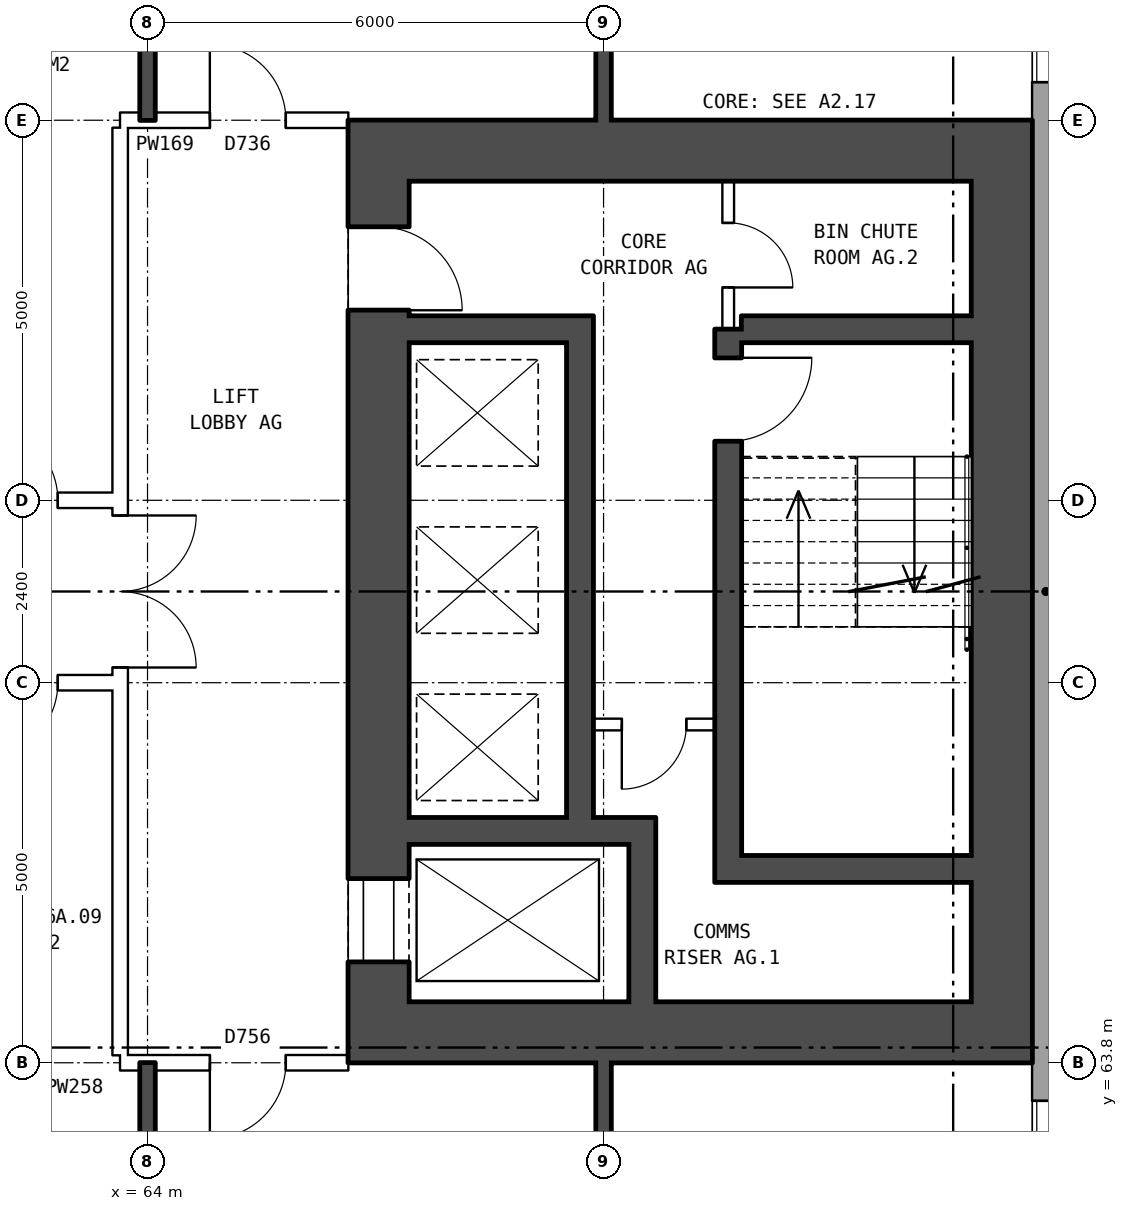
"""IFC4 building model, lengths in metres.
Left out: names, types, materials, properties, quantities, classifications, styles, units other than length and angle.
Written with IfcOpenShell. Run it as: python <this file> out.ifc"""

import sys

from ifc_helpers import new_model, si_unit, direction, frame, frame_2d, origin, place, context, subcontext, project, spatial, rectangle, extrude, element, fill, save


model = new_model("IFC4")
c1 = context("Model", 3, precision=1e-05, world=origin(), true_north=direction((0.0, 1.0)))
c2 = subcontext(c1, "Body", "Model", "MODEL_VIEW")
j1 = project(units=[si_unit("LENGTHUNIT", "METRE"), si_unit("PLANEANGLEUNIT", "RADIAN")], contexts=[c1])
p1 = place(None, origin())
s1 = spatial("IfcSite", under=j1, at=p1, CompositionType="ELEMENT")
p2 = place(p1, origin())
s2 = spatial("IfcBuilding", under=s1, at=p2, CompositionType="ELEMENT")
p3 = place(p2, frame((0.0, 0.0, 59.8)))
s3 = spatial("IfcBuildingStorey", under=s2, at=p3, CompositionType="ELEMENT", Elevation=59.8)
p4 = place(p3, frame((75.82, 57.075, 0.0), z_axis=(0.0, 0.0, 1.0), x_axis=(0.0, 1.0, 0.0)))
e1 = element("IfcWall", 1, at=p4, inside=s3, PredefinedType="STANDARD", context=c2, shape_type="SweptSolid", body=[
    extrude(rectangle(XDim=25.851, YDim=0.36, at=frame_2d((12.925, 0.0))), origin(), (0.0, 0.0, 1.0), 2.85),
])
p5 = place(p4, frame((1.625, 0.0, 0.8)))
e2 = element("IfcOpeningElement", 2, at=p5, cuts=e1, PredefinedType="OPENING", context=c2, shape_type="SweptSolid", body=[
    extrude(rectangle(XDim=1.6, YDim=1.8, at=frame_2d((0.8, 0.9))), frame((0.0, 0.19, 0.0), z_axis=(0.0, -1.0, 0.0), x_axis=(1.0, 0.0, 0.0)), (0.0, 0.0, 1.0), 0.38),
])
p6 = place(p4, frame((4.625, 0.0, 0.8)))
e3 = element("IfcOpeningElement", 3, at=p6, cuts=e1, PredefinedType="OPENING", context=c2, shape_type="SweptSolid", body=[
    extrude(rectangle(XDim=1.6, YDim=1.8, at=frame_2d((0.8, 0.9))), frame((0.0, 0.19, 0.0), z_axis=(0.0, -1.0, 0.0), x_axis=(1.0, 0.0, 0.0)), (0.0, 0.0, 1.0), 0.38),
])
p7 = place(p4, frame((19.625, 0.0, 0.8)))
e4 = element("IfcOpeningElement", 4, at=p7, cuts=e1, PredefinedType="OPENING", context=c2, shape_type="SweptSolid", body=[
    extrude(rectangle(XDim=1.6, YDim=1.8, at=frame_2d((0.8, 0.9))), frame((0.0, 0.19, 0.0), z_axis=(0.0, -1.0, 0.0), x_axis=(1.0, 0.0, 0.0)), (0.0, 0.0, 1.0), 0.38),
])
p8 = place(p4, frame((22.625, 0.0, 0.8)))
e5 = element("IfcOpeningElement", 5, at=p8, cuts=e1, PredefinedType="OPENING", context=c2, shape_type="SweptSolid", body=[
    extrude(rectangle(XDim=1.6, YDim=1.8, at=frame_2d((0.8, 0.9))), frame((0.0, 0.19, 0.0), z_axis=(0.0, -1.0, 0.0), x_axis=(1.0, 0.0, 0.0)), (0.0, 0.0, 1.0), 0.38),
])
p9 = place(p3, frame((67.04, 64.6, 0.0), z_axis=(0.0, 0.0, 1.0), x_axis=(0.0, 1.0, 0.0)))
e6 = element("IfcWall", 6, at=p9, inside=s3, PredefinedType="SHEAR", context=c2, shape_type="SweptSolid", body=[
    extrude(rectangle(XDim=10.8, YDim=0.8, at=frame_2d((5.4, 0.0))), origin(), (0.0, 0.0, 1.0), 2.85),
])
p10 = place(p9, frame((0.525, 0.0, 0.0)))
e7 = element("IfcOpeningElement", 7, at=p10, cuts=e6, PredefinedType="OPENING", context=c2, shape_type="SweptSolid", body=[
    extrude(rectangle(XDim=1.1, YDim=2.1, at=frame_2d((0.55, 1.05))), frame((0.0, 0.41, 0.0), z_axis=(0.0, -1.0, 0.0), x_axis=(1.0, 0.0, 0.0)), (0.0, 0.0, 1.0), 0.82),
])
p11 = place(p9, frame((9.1, 0.0, 0.0)))
e8 = element("IfcOpeningElement", 8, at=p11, cuts=e6, PredefinedType="OPENING", context=c2, shape_type="SweptSolid", body=[
    extrude(rectangle(XDim=1.1, YDim=2.1, at=frame_2d((0.55, 1.05))), frame((0.0, 0.41, 0.0), z_axis=(0.0, -1.0, 0.0), x_axis=(1.0, 0.0, 0.0)), (0.0, 0.0, 1.0), 0.82),
])
p12 = place(p3, frame((75.24, 64.6, 0.0), z_axis=(0.0, 0.0, 1.0), x_axis=(0.0, 1.0, 0.0)))
e9 = element("IfcWall", 9, at=p12, inside=s3, PredefinedType="SHEAR", context=c2, shape_type="SweptSolid", body=[
    extrude(rectangle(XDim=10.8, YDim=0.8, at=frame_2d((5.4, 0.0))), origin(), (0.0, 0.0, 1.0), 2.85),
])
for number, where, z_axis, x_axis in (
    (10, (66.64, 64.2, 0.0), (0.0, 0.0, 1.0), (1.0, 0.0, 0.0)),
    (11, (66.64, 75.8, 0.0), (0.0, 0.0, 1.0), (1.0, 0.0, 0.0)),
):
    element("IfcWall", number, at=place(p3, frame(where, z_axis=z_axis, x_axis=x_axis)), inside=s3, PredefinedType="SHEAR", context=c2, shape_type="SweptSolid", body=[
        extrude(rectangle(XDim=9.0, YDim=0.8, at=frame_2d((4.5, 0.0))), origin(), (0.0, 0.0, 1.0), 2.85),
    ])
p13 = place(p3, frame((71.815, 66.35, 0.0), z_axis=(0.0, 0.0, 1.0), x_axis=(1.0, 0.0, 0.0)))
e12 = element("IfcWall", 12, at=p13, inside=s3, PredefinedType="SHEAR", context=c2, shape_type="SweptSolid", body=[
    extrude(rectangle(XDim=3.025, YDim=0.35, at=frame_2d((1.513, 0.0))), origin(), (0.0, 0.0, 1.0), 2.85),
])
p14 = place(p3, frame((67.44, 66.85, 0.0), z_axis=(0.0, 0.0, 1.0), x_axis=(1.0, 0.0, 0.0)))
e13 = element("IfcWall", 13, at=p14, inside=s3, PredefinedType="SHEAR", context=c2, shape_type="SweptSolid", body=[
    extrude(rectangle(XDim=3.245, YDim=0.35, at=frame_2d((1.623, 0.0))), origin(), (0.0, 0.0, 1.0), 2.85),
])
p15 = place(p3, frame((69.865, 68.25, 0.0), z_axis=(0.0, 0.0, 1.0), x_axis=(1.0, 0.0, 0.0)))
e14 = element("IfcWall", 14, at=p15, inside=s3, PredefinedType="PARTITIONING", context=c2, shape_type="SweptSolid", body=[
    extrude(rectangle(XDim=1.6, YDim=0.15, at=frame_2d((0.8, 0.0))), origin(), (0.0, 0.0, 1.0), 2.85),
])
p16 = place(p15, frame((0.375, 0.0, 0.0)))
e15 = element("IfcOpeningElement", 15, at=p16, cuts=e14, PredefinedType="OPENING", context=c2, shape_type="SweptSolid", body=[
    extrude(rectangle(XDim=0.85, YDim=2.1, at=frame_2d((0.425, 1.05))), frame((0.0, 0.085, 0.0), z_axis=(0.0, -1.0, 0.0), x_axis=(1.0, 0.0, 0.0)), (0.0, 0.0, 1.0), 0.17),
])
p17 = place(p3, frame((67.44, 73.45, 0.0), z_axis=(0.0, 0.0, 1.0), x_axis=(1.0, 0.0, 0.0)))
e16 = element("IfcWall", 16, at=p17, inside=s3, PredefinedType="SHEAR", context=c2, shape_type="SweptSolid", body=[
    extrude(rectangle(XDim=2.075, YDim=0.35, at=frame_2d((1.038, 0.0))), origin(), (0.0, 0.0, 1.0), 2.85),
])
p18 = place(p3, frame((71.815, 73.45, 0.0), z_axis=(0.0, 0.0, 1.0), x_axis=(1.0, 0.0, 0.0)))
e17 = element("IfcWall", 17, at=p18, inside=s3, PredefinedType="SHEAR", context=c2, shape_type="SweptSolid", body=[
    extrude(rectangle(XDim=3.025, YDim=0.35, at=frame_2d((1.513, 0.0))), origin(), (0.0, 0.0, 1.0), 2.85),
])
p19 = place(p3, frame((69.69, 67.025, 0.0), z_axis=(0.0, 0.0, 1.0), x_axis=(0.0, 1.0, 0.0)))
e18 = element("IfcWall", 18, at=p19, inside=s3, PredefinedType="SHEAR", context=c2, shape_type="SweptSolid", body=[
    extrude(rectangle(XDim=6.6, YDim=0.35, at=frame_2d((3.3, 0.0))), origin(), (0.0, 0.0, 1.0), 2.85),
])
p20 = place(p3, frame((70.51, 64.6, 0.0), z_axis=(0.0, 0.0, 1.0), x_axis=(0.0, 1.0, 0.0)))
e19 = element("IfcWall", 19, at=p20, inside=s3, PredefinedType="SHEAR", context=c2, shape_type="SweptSolid", body=[
    extrude(rectangle(XDim=2.075, YDim=0.35, at=frame_2d((1.038, 0.0))), origin(), (0.0, 0.0, 1.0), 2.85),
])
p21 = place(p3, frame((71.64, 66.175, 0.0), z_axis=(0.0, 0.0, 1.0), x_axis=(0.0, 1.0, 0.0)))
e20 = element("IfcWall", 20, at=p21, inside=s3, PredefinedType="SHEAR", context=c2, shape_type="SweptSolid", body=[
    extrude(rectangle(XDim=7.275, YDim=0.35, at=frame_2d((3.637, 0.0))), origin(), (0.0, 0.0, 1.0), 2.85),
])
p22 = place(p21, frame((5.8, 0.0, 0.0)))
e21 = element("IfcOpeningElement", 21, at=p22, cuts=e20, PredefinedType="OPENING", context=c2, shape_type="SweptSolid", body=[
    extrude(rectangle(XDim=1.1, YDim=2.1, at=frame_2d((0.55, 1.05))), frame((0.0, 0.185, 0.0), z_axis=(0.0, -1.0, 0.0), x_axis=(1.0, 0.0, 0.0)), (0.0, 0.0, 1.0), 0.37),
])
p23 = place(p3, frame((71.64, 73.45, 0.0), z_axis=(0.0, 0.0, 1.0), x_axis=(0.0, 1.0, 0.0)))
e22 = element("IfcWall", 22, at=p23, inside=s3, PredefinedType="PARTITIONING", context=c2, shape_type="SweptSolid", body=[
    extrude(rectangle(XDim=1.95, YDim=0.15, at=frame_2d((0.975, 0.0))), origin(), (0.0, 0.0, 1.0), 2.85),
])
p24 = place(p23, frame((0.55, 0.0, 0.0)))
e23 = element("IfcOpeningElement", 23, at=p24, cuts=e22, PredefinedType="OPENING", context=c2, shape_type="SweptSolid", body=[
    extrude(rectangle(XDim=0.85, YDim=2.1, at=frame_2d((0.425, 1.05))), frame((0.0, 0.085, 0.0), z_axis=(0.0, -1.0, 0.0), x_axis=(1.0, 0.0, 0.0)), (0.0, 0.0, 1.0), 0.17),
])
p25 = place(p3, frame((63.64, 63.9, 0.0), z_axis=(0.0, 0.0, 1.0), x_axis=(0.0, 1.0, 0.0)))
e24 = element("IfcWall", 24, at=p25, inside=s3, PredefinedType="PARTITIONING", context=c2, shape_type="SweptSolid", body=[
    extrude(rectangle(XDim=12.2, YDim=0.2, at=frame_2d((6.1, 0.0))), origin(), (0.0, 0.0, 1.0), 2.85),
])
p26 = place(p25, frame((5.1, 0.0, 0.0)))
e25 = element("IfcOpeningElement", 25, at=p26, cuts=e24, PredefinedType="OPENING", context=c2, shape_type="SweptSolid", body=[
    extrude(rectangle(XDim=2.0, YDim=2.1, at=frame_2d((1.0, 1.05))), frame((0.0, 0.11, 0.0), z_axis=(0.0, -1.0, 0.0), x_axis=(1.0, 0.0, 0.0)), (0.0, 0.0, 1.0), 0.22),
])
p27 = place(p3, frame((63.64, 63.8, 0.0), z_axis=(0.0, 0.0, 1.0), x_axis=(1.0, 0.0, 0.0)))
e26 = element("IfcWall", 26, at=p27, inside=s3, PredefinedType="PARTITIONING", context=c2, shape_type="SweptSolid", body=[
    extrude(rectangle(XDim=3.0, YDim=0.2, at=frame_2d((1.5, 0.0))), origin(), (0.0, 0.0, 1.0), 2.85),
])
p28 = place(p27, frame((1.18, 0.0, 0.0)))
e27 = element("IfcOpeningElement", 27, at=p28, cuts=e26, PredefinedType="OPENING", context=c2, shape_type="SweptSolid", body=[
    extrude(rectangle(XDim=1.0, YDim=2.1, at=frame_2d((0.5, 1.05))), frame((0.0, 0.11, 0.0), z_axis=(0.0, -1.0, 0.0), x_axis=(1.0, 0.0, 0.0)), (0.0, 0.0, 1.0), 0.22),
])
p29 = place(p3, frame((44.36, 68.8, 0.0), z_axis=(0.0, 0.0, 1.0), x_axis=(1.0, 0.0, 0.0)))
e28 = element("IfcWall", 28, at=p29, inside=s3, PredefinedType="PARTITIONING", context=c2, shape_type="SweptSolid", body=[
    extrude(rectangle(XDim=19.28, YDim=0.2, at=frame_2d((9.64, 0.0))), origin(), (0.0, 0.0, 1.0), 2.85),
])
p30 = place(p29, frame((17.46, 0.0, 0.0)))
e29 = element("IfcOpeningElement", 29, at=p30, cuts=e28, PredefinedType="OPENING", context=c2, shape_type="SweptSolid", body=[
    extrude(rectangle(XDim=1.0, YDim=2.1, at=frame_2d((0.5, 1.05))), frame((0.0, 0.11, 0.0), z_axis=(0.0, -1.0, 0.0), x_axis=(1.0, 0.0, 0.0)), (0.0, 0.0, 1.0), 0.22),
])
p31 = place(p29, frame((11.64, 0.0, 0.0)))
e30 = element("IfcOpeningElement", 30, at=p31, cuts=e28, PredefinedType="OPENING", context=c2, shape_type="SweptSolid", body=[
    extrude(rectangle(XDim=1.0, YDim=2.1, at=frame_2d((0.5, 1.05))), frame((0.0, 0.11, 0.0), z_axis=(0.0, -1.0, 0.0), x_axis=(1.0, 0.0, 0.0)), (0.0, 0.0, 1.0), 0.22),
])
p32 = place(p29, frame((2.64, 0.0, 0.0)))
e31 = element("IfcOpeningElement", 31, at=p32, cuts=e28, PredefinedType="OPENING", context=c2, shape_type="SweptSolid", body=[
    extrude(rectangle(XDim=1.0, YDim=2.1, at=frame_2d((0.5, 1.05))), frame((0.0, 0.11, 0.0), z_axis=(0.0, -1.0, 0.0), x_axis=(1.0, 0.0, 0.0)), (0.0, 0.0, 1.0), 0.22),
])
p33 = place(p3, frame((44.36, 71.2, 0.0), z_axis=(0.0, 0.0, 1.0), x_axis=(1.0, 0.0, 0.0)))
e32 = element("IfcWall", 32, at=p33, inside=s3, PredefinedType="PARTITIONING", context=c2, shape_type="SweptSolid", body=[
    extrude(rectangle(XDim=19.28, YDim=0.2, at=frame_2d((9.64, 0.0))), origin(), (0.0, 0.0, 1.0), 2.85),
])
p34 = place(p33, frame((17.46, 0.0, 0.0)))
e33 = element("IfcOpeningElement", 33, at=p34, cuts=e32, PredefinedType="OPENING", context=c2, shape_type="SweptSolid", body=[
    extrude(rectangle(XDim=1.0, YDim=2.1, at=frame_2d((0.5, 1.05))), frame((0.0, 0.11, 0.0), z_axis=(0.0, -1.0, 0.0), x_axis=(1.0, 0.0, 0.0)), (0.0, 0.0, 1.0), 0.22),
])
p35 = place(p33, frame((8.64, 0.0, 0.0)))
e34 = element("IfcOpeningElement", 34, at=p35, cuts=e32, PredefinedType="OPENING", context=c2, shape_type="SweptSolid", body=[
    extrude(rectangle(XDim=1.0, YDim=2.1, at=frame_2d((0.5, 1.05))), frame((0.0, 0.11, 0.0), z_axis=(0.0, -1.0, 0.0), x_axis=(1.0, 0.0, 0.0)), (0.0, 0.0, 1.0), 0.22),
])
p36 = place(p33, frame((5.64, 0.0, 0.0)))
e35 = element("IfcOpeningElement", 35, at=p36, cuts=e32, PredefinedType="OPENING", context=c2, shape_type="SweptSolid", body=[
    extrude(rectangle(XDim=1.0, YDim=2.1, at=frame_2d((0.5, 1.05))), frame((0.0, 0.11, 0.0), z_axis=(0.0, -1.0, 0.0), x_axis=(1.0, 0.0, 0.0)), (0.0, 0.0, 1.0), 0.22),
])
p37 = place(p3, frame((63.64, 76.2, 0.0), z_axis=(0.0, 0.0, 1.0), x_axis=(1.0, 0.0, 0.0)))
e36 = element("IfcWall", 36, at=p37, inside=s3, PredefinedType="PARTITIONING", context=c2, shape_type="SweptSolid", body=[
    extrude(rectangle(XDim=3.0, YDim=0.2, at=frame_2d((1.5, 0.0))), origin(), (0.0, 0.0, 1.0), 2.85),
])
p38 = place(p37, frame((1.18, 0.0, 0.0)))
e37 = element("IfcOpeningElement", 37, at=p38, cuts=e36, PredefinedType="OPENING", context=c2, shape_type="SweptSolid", body=[
    extrude(rectangle(XDim=1.0, YDim=2.1, at=frame_2d((0.5, 1.05))), frame((0.0, 0.11, 0.0), z_axis=(0.0, -1.0, 0.0), x_axis=(1.0, 0.0, 0.0)), (0.0, 0.0, 1.0), 0.22),
])
for number, where, z_axis, x_axis in (
    (38, (64.0, 54.36, 0.0), (0.0, 0.0, 1.0), (0.0, 1.0, 0.0)),
    (39, (64.0, 76.2, 0.0), (0.0, 0.0, 1.0), (0.0, 1.0, 0.0)),
):
    element("IfcWall", number, at=place(p3, frame(where, z_axis=z_axis, x_axis=x_axis)), inside=s3, PredefinedType="SOLIDWALL", context=c2, shape_type="SweptSolid", body=[
        extrude(rectangle(XDim=9.44, YDim=0.2, at=frame_2d((4.72, 0.0))), origin(), (0.0, 0.0, 1.0), 2.85),
    ])
p39 = place(p3, frame((70.0, 54.36, 0.0), z_axis=(0.0, 0.0, 1.0), x_axis=(0.0, 1.0, 0.0)))
e40 = element("IfcWall", 40, at=p39, inside=s3, PredefinedType="SOLIDWALL", context=c2, shape_type="SweptSolid", body=[
    extrude(rectangle(XDim=9.44, YDim=0.2, at=frame_2d((4.72, 0.0))), origin(), (0.0, 0.0, 1.0), 2.85),
])
p40 = place(p39, frame((7.04, 0.0, 0.0)))
e41 = element("IfcOpeningElement", 41, at=p40, cuts=e40, PredefinedType="OPENING", context=c2, shape_type="SweptSolid", body=[
    extrude(rectangle(XDim=0.9, YDim=2.1, at=frame_2d((0.45, 1.05))), frame((0.0, 0.11, 0.0), z_axis=(0.0, -1.0, 0.0), x_axis=(1.0, 0.0, 0.0)), (0.0, 0.0, 1.0), 0.22),
])
p41 = place(p3, frame((70.0, 76.2, 0.0), z_axis=(0.0, 0.0, 1.0), x_axis=(0.0, 1.0, 0.0)))
e42 = element("IfcWall", 42, at=p41, inside=s3, PredefinedType="SOLIDWALL", context=c2, shape_type="SweptSolid", body=[
    extrude(rectangle(XDim=9.44, YDim=0.2, at=frame_2d((4.72, 0.0))), origin(), (0.0, 0.0, 1.0), 2.85),
])
p42 = place(p41, frame((7.17, 0.0, 0.0)))
e43 = element("IfcOpeningElement", 43, at=p42, cuts=e42, PredefinedType="OPENING", context=c2, shape_type="SweptSolid", body=[
    extrude(rectangle(XDim=0.9, YDim=2.1, at=frame_2d((0.45, 1.05))), frame((0.0, 0.11, 0.0), z_axis=(0.0, -1.0, 0.0), x_axis=(1.0, 0.0, 0.0)), (0.0, 0.0, 1.0), 0.22),
])
p43 = place(p41, frame((1.2, 0.0, 0.0)))
e44 = element("IfcOpeningElement", 44, at=p43, cuts=e42, PredefinedType="OPENING", context=c2, shape_type="SweptSolid", body=[
    extrude(rectangle(XDim=0.9, YDim=2.1, at=frame_2d((0.45, 1.05))), frame((0.0, 0.11, 0.0), z_axis=(0.0, -1.0, 0.0), x_axis=(1.0, 0.0, 0.0)), (0.0, 0.0, 1.0), 0.22),
])
p44 = place(p6, origin())
e45 = element("IfcWindow", 45, at=p44, inside=s3, PartitioningType="SINGLE_PANEL", PredefinedType="WINDOW", context=c2, shape_type="SweptSolid", body=[
    extrude(rectangle(XDim=1.6, YDim=1.8, at=frame_2d((0.8, 0.9))), frame((0.0, 0.15, 0.0), z_axis=(0.0, -1.0, 0.0), x_axis=(1.0, 0.0, 0.0)), (0.0, 0.0, 1.0), 0.06),
])
fill(e3, e45)
p45 = place(p7, origin())
e46 = element("IfcWindow", 46, at=p45, inside=s3, PartitioningType="SINGLE_PANEL", PredefinedType="WINDOW", context=c2, shape_type="SweptSolid", body=[
    extrude(rectangle(XDim=1.6, YDim=1.8, at=frame_2d((0.8, 0.9))), frame((0.0, 0.15, 0.0), z_axis=(0.0, -1.0, 0.0), x_axis=(1.0, 0.0, 0.0)), (0.0, 0.0, 1.0), 0.06),
])
fill(e4, e46)
p46 = place(p10, origin())
e47 = element("IfcDoor", 47, at=p46, inside=s3, OperationType="DOUBLE_DOOR_SLIDING", PredefinedType="DOOR", context=c2, shape_type="SweptSolid", body=[
    extrude(rectangle(XDim=1.1, YDim=2.1, at=frame_2d((0.55, 1.05))), frame((0.0, -0.335, 0.0), z_axis=(0.0, -1.0, 0.0), x_axis=(1.0, 0.0, 0.0)), (0.0, 0.0, 1.0), 0.05),
])
fill(e7, e47)
p47 = place(p11, frame((1.1, 0.0, 0.0), z_axis=(0.0, 0.0, 1.0), x_axis=(-1.0, 0.0, 0.0)))
e48 = element("IfcDoor", 48, at=p47, inside=s3, OperationType="SINGLE_SWING_RIGHT", PredefinedType="DOOR", context=c2, shape_type="SweptSolid", body=[
    extrude(rectangle(XDim=1.1, YDim=2.1, at=frame_2d((0.55, 1.05))), frame((0.0, 0.385, 0.0), z_axis=(0.0, -1.0, 0.0), x_axis=(1.0, 0.0, 0.0)), (0.0, 0.0, 1.0), 0.05),
])
fill(e8, e48)
p48 = place(p22, frame((1.1, 0.0, 0.0), z_axis=(0.0, 0.0, 1.0), x_axis=(-1.0, 0.0, 0.0)))
e49 = element("IfcDoor", 49, at=p48, inside=s3, OperationType="SINGLE_SWING_LEFT", PredefinedType="DOOR", context=c2, shape_type="SweptSolid", body=[
    extrude(rectangle(XDim=1.1, YDim=2.1, at=frame_2d((0.55, 1.05))), frame((0.0, 0.025, 0.0), z_axis=(0.0, -1.0, 0.0), x_axis=(1.0, 0.0, 0.0)), (0.0, 0.0, 1.0), 0.05),
])
fill(e21, e49)
p49 = place(p16, frame((0.85, 0.0, 0.0), z_axis=(0.0, 0.0, 1.0), x_axis=(-1.0, 0.0, 0.0)))
e50 = element("IfcDoor", 50, at=p49, inside=s3, OperationType="SINGLE_SWING_RIGHT", PredefinedType="DOOR", context=c2, shape_type="SweptSolid", body=[
    extrude(rectangle(XDim=0.85, YDim=2.1, at=frame_2d((0.425, 1.05))), frame((0.0, 0.025, 0.0), z_axis=(0.0, -1.0, 0.0), x_axis=(1.0, 0.0, 0.0)), (0.0, 0.0, 1.0), 0.05),
])
fill(e15, e50)
p50 = place(p24, frame((0.85, 0.0, 0.0), z_axis=(0.0, 0.0, 1.0), x_axis=(-1.0, 0.0, 0.0)))
e51 = element("IfcDoor", 51, at=p50, inside=s3, OperationType="SINGLE_SWING_RIGHT", PredefinedType="DOOR", context=c2, shape_type="SweptSolid", body=[
    extrude(rectangle(XDim=0.85, YDim=2.1, at=frame_2d((0.425, 1.05))), frame((0.0, 0.025, 0.0), z_axis=(0.0, -1.0, 0.0), x_axis=(1.0, 0.0, 0.0)), (0.0, 0.0, 1.0), 0.05),
])
fill(e23, e51)
p51 = place(p26, frame((2.0, 0.0, 0.0), z_axis=(0.0, 0.0, 1.0), x_axis=(-1.0, 0.0, 0.0)))
e52 = element("IfcDoor", 52, at=p51, inside=s3, OperationType="DOUBLE_DOOR_SINGLE_SWING", PredefinedType="DOOR", context=c2, shape_type="SweptSolid", body=[
    extrude(rectangle(XDim=2.0, YDim=2.1, at=frame_2d((1.0, 1.05))), frame((0.0, 0.025, 0.0), z_axis=(0.0, -1.0, 0.0), x_axis=(1.0, 0.0, 0.0)), (0.0, 0.0, 1.0), 0.05),
])
fill(e25, e52)
p52 = place(p28, frame((1.0, 0.0, 0.0), z_axis=(0.0, 0.0, 1.0), x_axis=(-1.0, 0.0, 0.0)))
e53 = element("IfcDoor", 53, at=p52, inside=s3, OperationType="SINGLE_SWING_RIGHT", PredefinedType="DOOR", context=c2, shape_type="SweptSolid", body=[
    extrude(rectangle(XDim=1.0, YDim=2.1, at=frame_2d((0.5, 1.05))), frame((0.0, 0.025, 0.0), z_axis=(0.0, -1.0, 0.0), x_axis=(1.0, 0.0, 0.0)), (0.0, 0.0, 1.0), 0.05),
])
fill(e27, e53)
p53 = place(p38, origin())
e54 = element("IfcDoor", 54, at=p53, inside=s3, OperationType="SINGLE_SWING_LEFT", PredefinedType="DOOR", context=c2, shape_type="SweptSolid", body=[
    extrude(rectangle(XDim=1.0, YDim=2.1, at=frame_2d((0.5, 1.05))), frame((0.0, 0.025, 0.0), z_axis=(0.0, -1.0, 0.0), x_axis=(1.0, 0.0, 0.0)), (0.0, 0.0, 1.0), 0.05),
])
fill(e37, e54)
p54 = place(p30, frame((1.0, 0.0, 0.0), z_axis=(0.0, 0.0, 1.0), x_axis=(-1.0, 0.0, 0.0)))
e55 = element("IfcDoor", 55, at=p54, inside=s3, OperationType="SINGLE_SWING_RIGHT", PredefinedType="DOOR", context=c2, shape_type="SweptSolid", body=[
    extrude(rectangle(XDim=1.0, YDim=2.1, at=frame_2d((0.5, 1.05))), frame((0.0, 0.025, 0.0), z_axis=(0.0, -1.0, 0.0), x_axis=(1.0, 0.0, 0.0)), (0.0, 0.0, 1.0), 0.05),
])
fill(e29, e55)
p55 = place(p34, origin())
e56 = element("IfcDoor", 56, at=p55, inside=s3, OperationType="SINGLE_SWING_LEFT", PredefinedType="DOOR", context=c2, shape_type="SweptSolid", body=[
    extrude(rectangle(XDim=1.0, YDim=2.1, at=frame_2d((0.5, 1.05))), frame((0.0, 0.025, 0.0), z_axis=(0.0, -1.0, 0.0), x_axis=(1.0, 0.0, 0.0)), (0.0, 0.0, 1.0), 0.05),
])
fill(e33, e56)
save(model, sys.argv[1])
